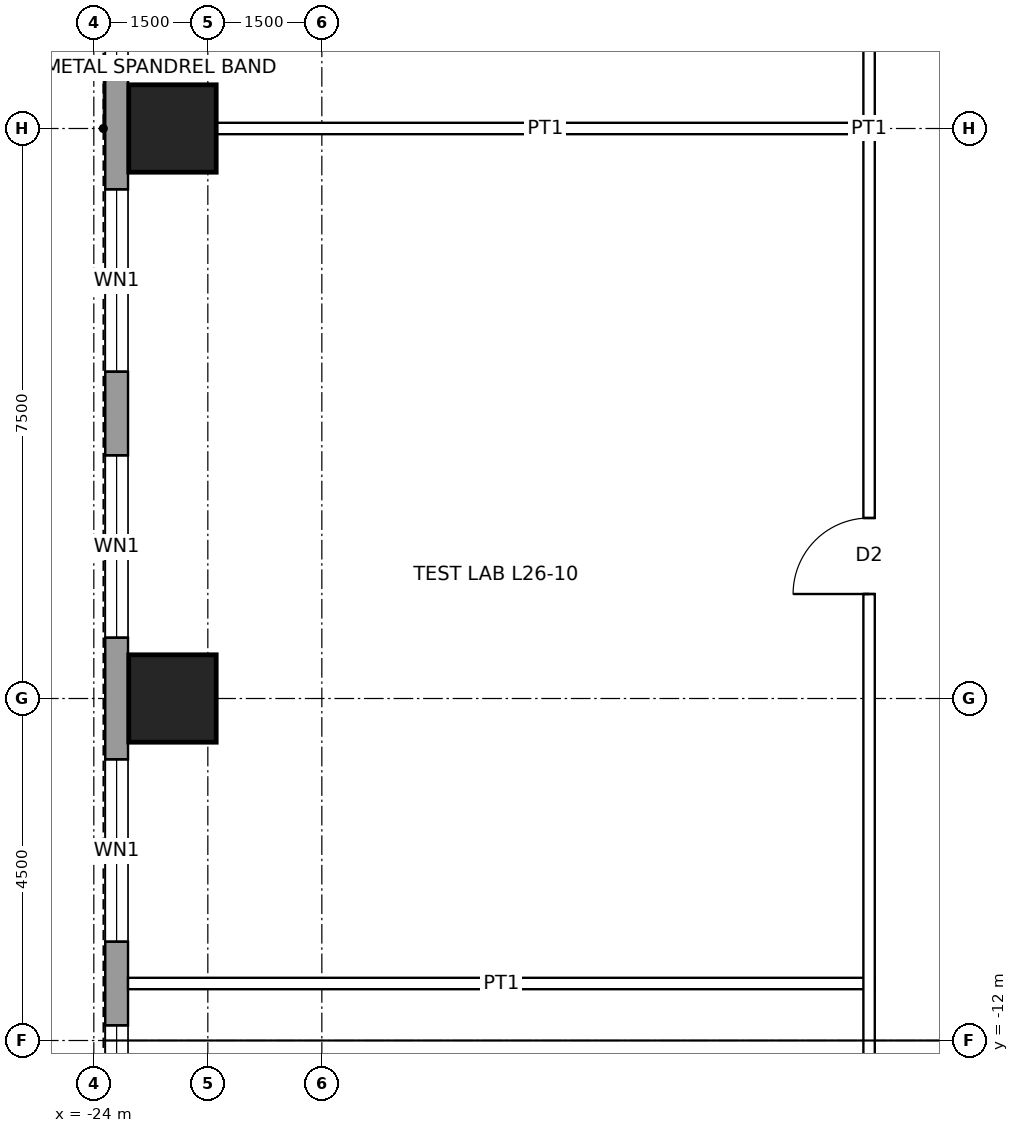
"""IFC4 building model, lengths in metres.
Left out: names, types, materials, properties, quantities, classifications, styles, units other than length and angle.
Written with IfcOpenShell. Run it as: python <this file> out.ifc"""

import sys

from ifc_helpers import new_model, si_unit, direction, frame, frame_2d, origin, origin_2d, place, context, subcontext, project, spatial, rectangle, hollow_rectangle, extrude, element, fill, save


model = new_model("IFC4")
c1 = context("Model", 3, precision=1e-05, world=origin(), true_north=direction((0.0, 1.0)))
c2 = subcontext(c1, "Body", "Model", "MODEL_VIEW")
j1 = project(units=[si_unit("LENGTHUNIT", "METRE"), si_unit("PLANEANGLEUNIT", "RADIAN")], contexts=[c1])
p1 = place(None, origin())
s1 = spatial("IfcSite", under=j1, at=p1, CompositionType="ELEMENT")
p2 = place(p1, origin())
s2 = spatial("IfcBuilding", under=s1, at=p2, CompositionType="ELEMENT")
p3 = place(p2, frame((0.0, 0.0, 131.4)))
s3 = spatial("IfcBuildingStorey", under=s2, at=p3, CompositionType="ELEMENT", Elevation=131.4)
for number, where, z_axis, x_axis in (
    (1, (-22.965, -7.5, 0.0), (0.0, 0.0, 1.0), (1.0, 0.0, 0.0)),
    (2, (-22.965, 0.0, 0.0), (0.0, 0.0, 1.0), (1.0, 0.0, 0.0)),
):
    element("IfcColumn", number, at=place(p3, frame(where, z_axis=z_axis, x_axis=x_axis)), inside=s3, PredefinedType="COLUMN", context=c2, shape_type="SweptSolid", body=[
        extrude(hollow_rectangle(XDim=1.15, YDim=1.15, WallThickness=0.075, at=origin_2d()), origin(), (0.0, 0.0, 1.0), 4.5),
    ])
p4 = place(p3, frame((-23.7, -16.2, 0.0), z_axis=(0.0, 0.0, 1.0), x_axis=(0.0, 1.0, 0.0)))
e3 = element("IfcWall", 3, at=p4, inside=s3, PredefinedType="SOLIDWALL", context=c2, shape_type="SweptSolid", body=[
    extrude(rectangle(XDim=32.4, YDim=0.3, at=frame_2d((16.2, 0.0))), origin(), (0.0, 0.0, 1.0), 4.3),
])
p5 = place(p4, frame((2.0, 0.0, 1.0)))
e4 = element("IfcOpeningElement", 4, at=p5, cuts=e3, PredefinedType="OPENING", context=c2, shape_type="SweptSolid", body=[
    extrude(rectangle(XDim=2.4, YDim=1.2, at=frame_2d((1.2, 0.6))), frame((0.0, 0.16, 0.0), z_axis=(0.0, -1.0, 0.0), x_axis=(1.0, 0.0, 0.0)), (0.0, 0.0, 1.0), 0.32),
])
p6 = place(p4, frame((5.5, 0.0, 1.0)))
e5 = element("IfcOpeningElement", 5, at=p6, cuts=e3, PredefinedType="OPENING", context=c2, shape_type="SweptSolid", body=[
    extrude(rectangle(XDim=2.4, YDim=1.2, at=frame_2d((1.2, 0.6))), frame((0.0, 0.16, 0.0), z_axis=(0.0, -1.0, 0.0), x_axis=(1.0, 0.0, 0.0)), (0.0, 0.0, 1.0), 0.32),
])
p7 = place(p4, frame((9.5, 0.0, 1.0)))
e6 = element("IfcOpeningElement", 6, at=p7, cuts=e3, PredefinedType="OPENING", context=c2, shape_type="SweptSolid", body=[
    extrude(rectangle(XDim=2.4, YDim=1.2, at=frame_2d((1.2, 0.6))), frame((0.0, 0.16, 0.0), z_axis=(0.0, -1.0, 0.0), x_axis=(1.0, 0.0, 0.0)), (0.0, 0.0, 1.0), 0.32),
])
p8 = place(p4, frame((13.0, 0.0, 1.0)))
e7 = element("IfcOpeningElement", 7, at=p8, cuts=e3, PredefinedType="OPENING", context=c2, shape_type="SweptSolid", body=[
    extrude(rectangle(XDim=2.4, YDim=1.2, at=frame_2d((1.2, 0.6))), frame((0.0, 0.16, 0.0), z_axis=(0.0, -1.0, 0.0), x_axis=(1.0, 0.0, 0.0)), (0.0, 0.0, 1.0), 0.32),
])
p9 = place(p4, frame((17.0, 0.0, 1.0)))
e8 = element("IfcOpeningElement", 8, at=p9, cuts=e3, PredefinedType="OPENING", context=c2, shape_type="SweptSolid", body=[
    extrude(rectangle(XDim=2.4, YDim=1.2, at=frame_2d((1.2, 0.6))), frame((0.0, 0.16, 0.0), z_axis=(0.0, -1.0, 0.0), x_axis=(1.0, 0.0, 0.0)), (0.0, 0.0, 1.0), 0.32),
])
p10 = place(p4, frame((20.5, 0.0, 1.0)))
e9 = element("IfcOpeningElement", 9, at=p10, cuts=e3, PredefinedType="OPENING", context=c2, shape_type="SweptSolid", body=[
    extrude(rectangle(XDim=2.4, YDim=1.2, at=frame_2d((1.2, 0.6))), frame((0.0, 0.16, 0.0), z_axis=(0.0, -1.0, 0.0), x_axis=(1.0, 0.0, 0.0)), (0.0, 0.0, 1.0), 0.32),
])
p11 = place(p4, frame((24.5, 0.0, 1.0)))
e10 = element("IfcOpeningElement", 10, at=p11, cuts=e3, PredefinedType="OPENING", context=c2, shape_type="SweptSolid", body=[
    extrude(rectangle(XDim=2.4, YDim=1.2, at=frame_2d((1.2, 0.6))), frame((0.0, 0.16, 0.0), z_axis=(0.0, -1.0, 0.0), x_axis=(1.0, 0.0, 0.0)), (0.0, 0.0, 1.0), 0.32),
])
p12 = place(p4, frame((28.0, 0.0, 1.0)))
e11 = element("IfcOpeningElement", 11, at=p12, cuts=e3, PredefinedType="OPENING", context=c2, shape_type="SweptSolid", body=[
    extrude(rectangle(XDim=2.4, YDim=1.2, at=frame_2d((1.2, 0.6))), frame((0.0, 0.16, 0.0), z_axis=(0.0, -1.0, 0.0), x_axis=(1.0, 0.0, 0.0)), (0.0, 0.0, 1.0), 0.32),
])
p13 = place(p3, frame((-23.55, -11.25, 0.0), z_axis=(0.0, 0.0, 1.0), x_axis=(1.0, 0.0, 0.0)))
e12 = element("IfcWall", 12, at=p13, inside=s3, PredefinedType="PARTITIONING", context=c2, shape_type="SweptSolid", body=[
    extrude(rectangle(XDim=9.825, YDim=0.15, at=frame_2d((4.913, 0.0))), origin(), (0.0, 0.0, 1.0), 3.431),
])
p14 = place(p3, frame((-22.39, 0.0, 0.0), z_axis=(0.0, 0.0, 1.0), x_axis=(1.0, 0.0, 0.0)))
e13 = element("IfcWall", 13, at=p14, inside=s3, PredefinedType="PARTITIONING", context=c2, shape_type="SweptSolid", body=[
    extrude(rectangle(XDim=8.665, YDim=0.15, at=frame_2d((4.333, 0.0))), origin(), (0.0, 0.0, 1.0), 3.431),
])
p15 = place(p3, frame((-13.8, -13.875, 0.0), z_axis=(0.0, 0.0, 1.0), x_axis=(0.0, 1.0, 0.0)))
e14 = element("IfcWall", 14, at=p15, inside=s3, PredefinedType="PARTITIONING", context=c2, shape_type="SweptSolid", body=[
    extrude(rectangle(XDim=27.75, YDim=0.15, at=frame_2d((13.875, 0.0))), origin(), (0.0, 0.0, 1.0), 4.3),
])
p16 = place(p15, frame((7.75, 0.0, 0.0)))
e15 = element("IfcOpeningElement", 15, at=p16, cuts=e14, PredefinedType="OPENING", context=c2, shape_type="SweptSolid", body=[
    extrude(rectangle(XDim=1.0, YDim=2.1, at=frame_2d((0.5, 1.05))), frame((0.0, 0.085, 0.0), z_axis=(0.0, -1.0, 0.0), x_axis=(1.0, 0.0, 0.0)), (0.0, 0.0, 1.0), 0.17),
])
p17 = place(p15, frame((18.6, 0.0, 0.0)))
e16 = element("IfcOpeningElement", 16, at=p17, cuts=e14, PredefinedType="OPENING", context=c2, shape_type="SweptSolid", body=[
    extrude(rectangle(XDim=1.8, YDim=2.4, at=frame_2d((0.9, 1.2))), frame((0.0, 0.085, 0.0), z_axis=(0.0, -1.0, 0.0), x_axis=(1.0, 0.0, 0.0)), (0.0, 0.0, 1.0), 0.17),
])
p18 = place(p5, origin())
e17 = element("IfcWindow", 17, at=p18, inside=s3, PartitioningType="SINGLE_PANEL", PredefinedType="WINDOW", context=c2, shape_type="SweptSolid", body=[
    extrude(rectangle(XDim=2.4, YDim=1.2, at=frame_2d((1.2, 0.6))), frame((0.0, 0.03, 0.0), z_axis=(0.0, -1.0, 0.0), x_axis=(1.0, 0.0, 0.0)), (0.0, 0.0, 1.0), 0.06),
])
fill(e4, e17)
p19 = place(p6, origin())
e18 = element("IfcWindow", 18, at=p19, inside=s3, PartitioningType="SINGLE_PANEL", PredefinedType="WINDOW", context=c2, shape_type="SweptSolid", body=[
    extrude(rectangle(XDim=2.4, YDim=1.2, at=frame_2d((1.2, 0.6))), frame((0.0, 0.03, 0.0), z_axis=(0.0, -1.0, 0.0), x_axis=(1.0, 0.0, 0.0)), (0.0, 0.0, 1.0), 0.06),
])
fill(e5, e18)
p20 = place(p7, origin())
e19 = element("IfcWindow", 19, at=p20, inside=s3, PartitioningType="SINGLE_PANEL", PredefinedType="WINDOW", context=c2, shape_type="SweptSolid", body=[
    extrude(rectangle(XDim=2.4, YDim=1.2, at=frame_2d((1.2, 0.6))), frame((0.0, 0.03, 0.0), z_axis=(0.0, -1.0, 0.0), x_axis=(1.0, 0.0, 0.0)), (0.0, 0.0, 1.0), 0.06),
])
fill(e6, e19)
p21 = place(p8, origin())
e20 = element("IfcWindow", 20, at=p21, inside=s3, PartitioningType="SINGLE_PANEL", PredefinedType="WINDOW", context=c2, shape_type="SweptSolid", body=[
    extrude(rectangle(XDim=2.4, YDim=1.2, at=frame_2d((1.2, 0.6))), frame((0.0, 0.03, 0.0), z_axis=(0.0, -1.0, 0.0), x_axis=(1.0, 0.0, 0.0)), (0.0, 0.0, 1.0), 0.06),
])
fill(e7, e20)
p22 = place(p9, origin())
e21 = element("IfcWindow", 21, at=p22, inside=s3, PartitioningType="SINGLE_PANEL", PredefinedType="WINDOW", context=c2, shape_type="SweptSolid", body=[
    extrude(rectangle(XDim=2.4, YDim=1.2, at=frame_2d((1.2, 0.6))), frame((0.0, 0.03, 0.0), z_axis=(0.0, -1.0, 0.0), x_axis=(1.0, 0.0, 0.0)), (0.0, 0.0, 1.0), 0.06),
])
fill(e8, e21)
p23 = place(p16, origin())
e22 = element("IfcDoor", 22, at=p23, inside=s3, OperationType="SINGLE_SWING_LEFT", PredefinedType="DOOR", context=c2, shape_type="SweptSolid", body=[
    extrude(rectangle(XDim=1.0, YDim=2.1, at=frame_2d((0.5, 1.05))), frame((0.0, 0.025, 0.0), z_axis=(0.0, -1.0, 0.0), x_axis=(1.0, 0.0, 0.0)), (0.0, 0.0, 1.0), 0.05),
])
fill(e15, e22)
save(model, sys.argv[1])
